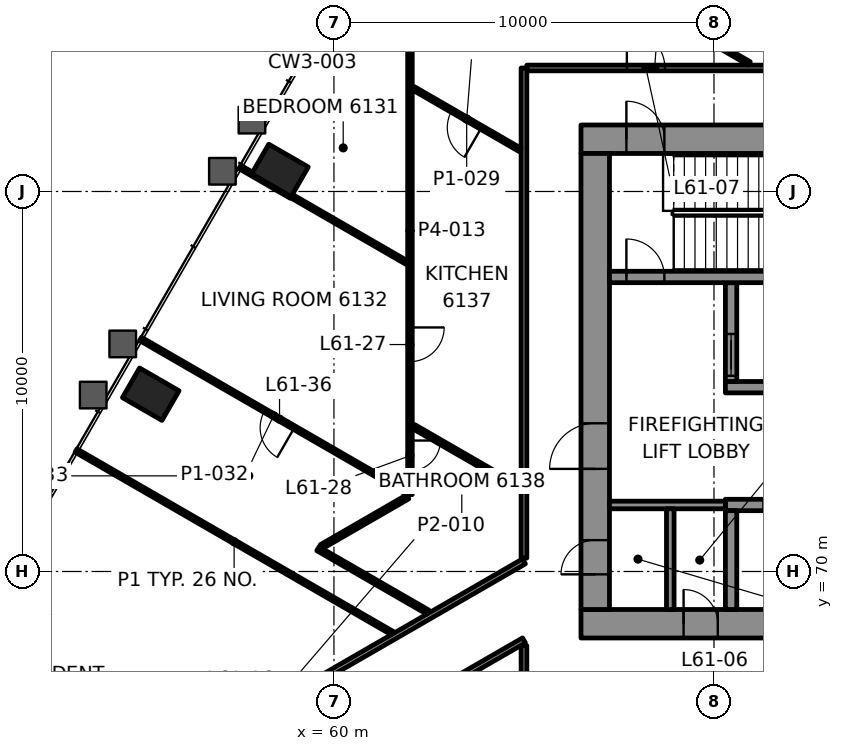
"""IFC4 building model, lengths in metres.
Left out: names, types, materials, properties, quantities, classifications, styles, units other than length and angle.
Written with IfcOpenShell. Run it as: python <this file> out.ifc"""

import sys

from ifc_helpers import new_model, si_unit, direction, frame, frame_2d, origin, origin_2d, place, context, subcontext, project, spatial, rectangle, hollow_rectangle, extrude, element, fill, save


model = new_model("IFC4")
c1 = context("Model", 3, precision=1e-05, world=origin(), true_north=direction((0.0, 1.0)))
c2 = subcontext(c1, "Body", "Model", "MODEL_VIEW")
j1 = project(units=[si_unit("LENGTHUNIT", "METRE"), si_unit("PLANEANGLEUNIT", "RADIAN")], contexts=[c1])
p1 = place(None, origin())
s1 = spatial("IfcSite", under=j1, at=p1, CompositionType="ELEMENT")
p2 = place(p1, origin())
s2 = spatial("IfcBuilding", under=s1, at=p2, CompositionType="ELEMENT")
p3 = place(p2, frame((0.0, 0.0, 260.1)))
s3 = spatial("IfcBuildingStorey", under=s2, at=p3, CompositionType="ELEMENT", Elevation=260.1)
for number, where, z_axis, x_axis in (
    (1, (58.579, 80.554, -0.0), (0.0, 0.0, 1.0), (-0.5, -0.866, 0.0)),
    (2, (55.179, 74.666, -0.0), (0.0, 0.0, 1.0), (-0.5, -0.866, 0.0)),
):
    element("IfcColumn", number, at=place(p3, frame(where, z_axis=z_axis, x_axis=x_axis)), inside=s3, PredefinedType="COLUMN", context=c2, shape_type="SweptSolid", body=[
        extrude(hollow_rectangle(XDim=0.9, YDim=1.2, WallThickness=0.06, at=origin_2d()), origin(), (0.0, 0.0, 1.0), 3.5),
    ])
p4 = place(p3, frame((66.5, 68.625, 0.0), z_axis=(0.0, 0.0, 1.0), x_axis=(1.0, 0.0, 0.0)))
e3 = element("IfcWall", 3, at=p4, inside=s3, PredefinedType="SHEAR", context=c2, shape_type="SweptSolid", body=[
    extrude(rectangle(XDim=17.0, YDim=0.75, at=frame_2d((8.5, 0.0))), origin(), (0.0, 0.0, 1.0), 3.3),
])
p5 = place(p4, frame((2.7, 0.0, 0.0)))
e4 = element("IfcOpeningElement", 4, at=p5, cuts=e3, PredefinedType="OPENING", context=c2, shape_type="SweptSolid", body=[
    extrude(rectangle(XDim=0.9, YDim=2.1, at=frame_2d((0.45, 1.05))), frame((0.0, 0.385, 0.0), z_axis=(0.0, -1.0, 0.0), x_axis=(1.0, 0.0, 0.0)), (0.0, 0.0, 1.0), 0.77),
])
p6 = place(p3, frame((66.5, 81.375, 0.0), z_axis=(0.0, 0.0, 1.0), x_axis=(1.0, 0.0, 0.0)))
e5 = element("IfcWall", 5, at=p6, inside=s3, PredefinedType="SHEAR", context=c2, shape_type="SweptSolid", body=[
    extrude(rectangle(XDim=17.0, YDim=0.75, at=frame_2d((8.5, 0.0))), origin(), (0.0, 0.0, 1.0), 3.3),
])
p7 = place(p6, frame((1.195, 0.0, 0.0)))
e6 = element("IfcOpeningElement", 6, at=p7, cuts=e5, PredefinedType="OPENING", context=c2, shape_type="SweptSolid", body=[
    extrude(rectangle(XDim=1.0, YDim=2.1, at=frame_2d((0.5, 1.05))), frame((0.0, 0.385, 0.0), z_axis=(0.0, -1.0, 0.0), x_axis=(1.0, 0.0, 0.0)), (0.0, 0.0, 1.0), 0.77),
])
p8 = place(p6, frame((15.005, 0.0, 0.0)))
e7 = element("IfcOpeningElement", 7, at=p8, cuts=e5, PredefinedType="OPENING", context=c2, shape_type="SweptSolid", body=[
    extrude(rectangle(XDim=1.0, YDim=2.1, at=frame_2d((0.5, 1.05))), frame((0.0, 0.385, 0.0), z_axis=(0.0, -1.0, 0.0), x_axis=(1.0, 0.0, 0.0)), (0.0, 0.0, 1.0), 0.77),
])
p9 = place(p6, frame((8.15, 0.0, 0.0)))
e8 = element("IfcOpeningElement", 8, at=p9, cuts=e5, PredefinedType="OPENING", context=c2, shape_type="SweptSolid", body=[
    extrude(rectangle(XDim=0.9, YDim=2.1, at=frame_2d((0.45, 1.05))), frame((0.0, 0.385, 0.0), z_axis=(0.0, -1.0, 0.0), x_axis=(1.0, 0.0, 0.0)), (0.0, 0.0, 1.0), 0.77),
])
p10 = place(p3, frame((66.875, 69.0, 0.0), z_axis=(0.0, 0.0, 1.0), x_axis=(0.0, 1.0, 0.0)))
e9 = element("IfcWall", 9, at=p10, inside=s3, PredefinedType="SHEAR", context=c2, shape_type="SweptSolid", body=[
    extrude(rectangle(XDim=12.0, YDim=0.75, at=frame_2d((6.0, 0.0))), origin(), (0.0, 0.0, 1.0), 3.3),
])
p11 = place(p10, frame((3.7, 0.0, 0.0)))
e10 = element("IfcOpeningElement", 10, at=p11, cuts=e9, PredefinedType="OPENING", context=c2, shape_type="SweptSolid", body=[
    extrude(rectangle(XDim=1.2, YDim=2.1, at=frame_2d((0.6, 1.05))), frame((0.0, 0.385, 0.0), z_axis=(0.0, -1.0, 0.0), x_axis=(1.0, 0.0, 0.0)), (0.0, 0.0, 1.0), 0.77),
])
p12 = place(p10, frame((0.925, 0.0, 0.0)))
e11 = element("IfcOpeningElement", 11, at=p12, cuts=e9, PredefinedType="OPENING", context=c2, shape_type="SweptSolid", body=[
    extrude(rectangle(XDim=0.9, YDim=2.1, at=frame_2d((0.45, 1.05))), frame((0.0, 0.385, 0.0), z_axis=(0.0, -1.0, 0.0), x_axis=(1.0, 0.0, 0.0)), (0.0, 0.0, 1.0), 0.77),
])
p13 = place(p3, frame((70.3, 71.75, 0.0), z_axis=(0.0, 0.0, 1.0), x_axis=(1.0, 0.0, 0.0)))
e12 = element("IfcWall", 12, at=p13, inside=s3, PredefinedType="SHEAR", context=c2, shape_type="SweptSolid", body=[
    extrude(rectangle(XDim=11.5, YDim=0.3, at=frame_2d((5.75, 0.0))), origin(), (0.0, 0.0, 1.0), 3.3),
])
p14 = place(p13, frame((1.0, 0.0, 0.0)))
e13 = element("IfcOpeningElement", 13, at=p14, cuts=e12, PredefinedType="OPENING", context=c2, shape_type="SweptSolid", body=[
    extrude(rectangle(XDim=1.1, YDim=2.1, at=frame_2d((0.55, 1.05))), frame((0.0, 0.16, 0.0), z_axis=(0.0, -1.0, 0.0), x_axis=(1.0, 0.0, 0.0)), (0.0, 0.0, 1.0), 0.32),
])
p15 = place(p13, frame((3.8, 0.0, 0.0)))
e14 = element("IfcOpeningElement", 14, at=p15, cuts=e12, PredefinedType="OPENING", context=c2, shape_type="SweptSolid", body=[
    extrude(rectangle(XDim=1.1, YDim=2.1, at=frame_2d((0.55, 1.05))), frame((0.0, 0.16, 0.0), z_axis=(0.0, -1.0, 0.0), x_axis=(1.0, 0.0, 0.0)), (0.0, 0.0, 1.0), 0.32),
])
p16 = place(p13, frame((6.6, 0.0, 0.0)))
e15 = element("IfcOpeningElement", 15, at=p16, cuts=e12, PredefinedType="OPENING", context=c2, shape_type="SweptSolid", body=[
    extrude(rectangle(XDim=1.1, YDim=2.1, at=frame_2d((0.55, 1.05))), frame((0.0, 0.16, 0.0), z_axis=(0.0, -1.0, 0.0), x_axis=(1.0, 0.0, 0.0)), (0.0, 0.0, 1.0), 0.32),
])
p17 = place(p13, frame((9.4, 0.0, 0.0)))
e16 = element("IfcOpeningElement", 16, at=p17, cuts=e12, PredefinedType="OPENING", context=c2, shape_type="SweptSolid", body=[
    extrude(rectangle(XDim=1.1, YDim=2.1, at=frame_2d((0.55, 1.05))), frame((0.0, 0.16, 0.0), z_axis=(0.0, -1.0, 0.0), x_axis=(1.0, 0.0, 0.0)), (0.0, 0.0, 1.0), 0.32),
])
p18 = place(p3, frame((70.3, 74.85, 0.0), z_axis=(0.0, 0.0, 1.0), x_axis=(1.0, 0.0, 0.0)))
e17 = element("IfcWall", 17, at=p18, inside=s3, PredefinedType="SHEAR", context=c2, shape_type="SweptSolid", body=[
    extrude(rectangle(XDim=5.9, YDim=0.3, at=frame_2d((2.95, 0.0))), origin(), (0.0, 0.0, 1.0), 3.3),
])
p19 = place(p18, frame((3.8, 0.0, 0.0)))
e18 = element("IfcOpeningElement", 18, at=p19, cuts=e17, PredefinedType="OPENING", context=c2, shape_type="SweptSolid", body=[
    extrude(rectangle(XDim=1.1, YDim=2.1, at=frame_2d((0.55, 1.05))), frame((0.0, 0.16, 0.0), z_axis=(0.0, -1.0, 0.0), x_axis=(1.0, 0.0, 0.0)), (0.0, 0.0, 1.0), 0.32),
])
p20 = place(p3, frame((70.45, 69.0, 0.0), z_axis=(0.0, 0.0, 1.0), x_axis=(0.0, 1.0, 0.0)))
e19 = element("IfcWall", 19, at=p20, inside=s3, PredefinedType="SHEAR", context=c2, shape_type="SweptSolid", body=[
    extrude(rectangle(XDim=2.6, YDim=0.3, at=frame_2d((1.3, 0.0))), origin(), (0.0, 0.0, 1.0), 3.3),
])
p21 = place(p3, frame((70.45, 75.0, 0.0), z_axis=(0.0, 0.0, 1.0), x_axis=(0.0, 1.0, 0.0)))
e20 = element("IfcWall", 20, at=p21, inside=s3, PredefinedType="SHEAR", context=c2, shape_type="SweptSolid", body=[
    extrude(rectangle(XDim=2.6, YDim=0.3, at=frame_2d((1.3, 0.0))), origin(), (0.0, 0.0, 1.0), 3.3),
])
p22 = place(p21, frame((0.15, 0.0, 0.0)))
e21 = element("IfcOpeningElement", 21, at=p22, cuts=e20, PredefinedType="OPENING", context=c2, shape_type="SweptSolid", body=[
    extrude(rectangle(XDim=1.1, YDim=2.1, at=frame_2d((0.55, 1.05))), frame((0.0, 0.16, 0.0), z_axis=(0.0, -1.0, 0.0), x_axis=(1.0, 0.0, 0.0)), (0.0, 0.0, 1.0), 0.32),
])
p23 = place(p3, frame((67.25, 77.75, 0.0), z_axis=(0.0, 0.0, 1.0), x_axis=(1.0, 0.0, 0.0)))
e22 = element("IfcWall", 22, at=p23, inside=s3, PredefinedType="SHEAR", context=c2, shape_type="SweptSolid", body=[
    extrude(rectangle(XDim=15.5, YDim=0.3, at=frame_2d((7.75, 0.0))), origin(), (0.0, 0.0, 1.0), 3.3),
])
p24 = place(p23, frame((0.445, 0.0, 0.0)))
e23 = element("IfcOpeningElement", 23, at=p24, cuts=e22, PredefinedType="OPENING", context=c2, shape_type="SweptSolid", body=[
    extrude(rectangle(XDim=1.0, YDim=2.1, at=frame_2d((0.5, 1.05))), frame((0.0, 0.16, 0.0), z_axis=(0.0, -1.0, 0.0), x_axis=(1.0, 0.0, 0.0)), (0.0, 0.0, 1.0), 0.32),
])
p25 = place(p3, frame((65.075, 83.25, 0.0), z_axis=(0.0, 0.0, 1.0), x_axis=(1.0, 0.0, 0.0)))
e24 = element("IfcWall", 24, at=p25, inside=s3, PredefinedType="PARTITIONING", context=c2, shape_type="SweptSolid", body=[
    extrude(rectangle(XDim=6.725, YDim=0.15, at=frame_2d((3.362, 0.0))), origin(), (0.0, 0.0, 1.0), 2.7),
])
p26 = place(p25, frame((2.632, 0.0, 0.0)))
e25 = element("IfcOpeningElement", 25, at=p26, cuts=e24, PredefinedType="OPENING", context=c2, shape_type="SweptSolid", body=[
    extrude(rectangle(XDim=1.0, YDim=2.1, at=frame_2d((0.5, 1.05))), frame((0.0, 0.085, 0.0), z_axis=(0.0, -1.0, 0.0), x_axis=(1.0, 0.0, 0.0)), (0.0, 0.0, 1.0), 0.17),
])
p27 = place(p3, frame((65.0, 68.187, 0.0), z_axis=(0.0, 0.0, 1.0), x_axis=(-0.866027660432, -0.499996091351, 0.0)))
e26 = element("IfcWall", 26, at=p27, inside=s3, PredefinedType="PARTITIONING", context=c2, shape_type="SweptSolid", body=[
    extrude(rectangle(XDim=14.494, YDim=0.15, at=frame_2d((7.247, 0.0))), origin(), (0.0, 0.0, 1.0), 2.547),
])
p28 = place(p27, frame((6.324, 0.0, 0.0)))
e27 = element("IfcOpeningElement", 27, at=p28, cuts=e26, PredefinedType="OPENING", context=c2, shape_type="SweptSolid", body=[
    extrude(rectangle(XDim=0.9, YDim=2.1, at=frame_2d((0.45, 1.05))), frame((0.0, 0.085, 0.0), z_axis=(0.0, -1.0, 0.0), x_axis=(1.0, 0.0, 0.0)), (0.0, 0.0, 1.0), 0.17),
])
p29 = place(p27, frame((12.004, 0.0, 0.0)))
e28 = element("IfcOpeningElement", 28, at=p29, cuts=e26, PredefinedType="OPENING", context=c2, shape_type="SweptSolid", body=[
    extrude(rectangle(XDim=0.9, YDim=2.1, at=frame_2d((0.45, 1.05))), frame((0.0, 0.085, 0.0), z_axis=(0.0, -1.0, 0.0), x_axis=(1.0, 0.0, 0.0)), (0.0, 0.0, 1.0), 0.17),
])
p30 = place(p3, frame((51.549, 62.5, 0.0), z_axis=(0.0, 0.0, 1.0), x_axis=(0.866020420161, 0.50000863179, 0.0)))
e29 = element("IfcWall", 29, at=p30, inside=s3, PredefinedType="PARTITIONING", context=c2, shape_type="SweptSolid", body=[
    extrude(rectangle(XDim=15.532, YDim=0.15, at=frame_2d((7.766, 0.0))), origin(), (0.0, 0.0, 1.0), 2.7),
])
p31 = place(p30, frame((5.474, 0.0, 0.0)))
e30 = element("IfcOpeningElement", 30, at=p31, cuts=e29, PredefinedType="OPENING", context=c2, shape_type="SweptSolid", body=[
    extrude(rectangle(XDim=0.9, YDim=2.1, at=frame_2d((0.45, 1.05))), frame((0.0, 0.085, 0.0), z_axis=(0.0, -1.0, 0.0), x_axis=(1.0, 0.0, 0.0)), (0.0, 0.0, 1.0), 0.17),
])
p32 = place(p3, frame((59.673, 70.655, 0.0), z_axis=(0.0, 0.0, 1.0), x_axis=(0.866053563643, 0.499951222523, 0.0)))
e31 = element("IfcWall", 31, at=p32, inside=s3, PredefinedType="PARTITIONING", context=c2, shape_type="SweptSolid", body=[
    extrude(rectangle(XDim=2.617, YDim=0.12, at=frame_2d((1.309, 0.0))), origin(), (0.0, 0.0, 1.0), 2.7),
])
p33 = place(p3, frame((65.0, 66.825, 0.0), z_axis=(0.0, 0.0, 1.0), x_axis=(0.0, 1.0, 0.0)))
e32 = element("IfcWall", 32, at=p33, inside=s3, PredefinedType="PARTITIONING", context=c2, shape_type="SweptSolid", body=[
    extrude(rectangle(XDim=1.226, YDim=0.15, at=frame_2d((0.613, 0.0))), origin(), (0.0, 0.0, 1.0), 2.547),
])
p34 = place(p3, frame((65.0, 70.352, 0.0), z_axis=(0.0, 0.0, 1.0), x_axis=(0.0, 1.0, 0.0)))
e33 = element("IfcWall", 33, at=p34, inside=s3, PredefinedType="PARTITIONING", context=c2, shape_type="SweptSolid", body=[
    extrude(rectangle(XDim=12.897, YDim=0.15, at=frame_2d((6.449, 0.0))), origin(), (0.0, 0.0, 1.0), 2.7),
])
p35 = place(p3, frame((62.0, 85.912, 0.0), z_axis=(0.0, 0.0, 1.0), x_axis=(0.0, -1.0, 0.0)))
e34 = element("IfcWall", 34, at=p35, inside=s3, PredefinedType="PARTITIONING", context=c2, shape_type="SweptSolid", body=[
    extrude(rectangle(XDim=13.888, YDim=0.12, at=frame_2d((6.944, 0.0))), origin(), (0.0, 0.0, 1.0), 2.7),
])
p36 = place(p35, frame((1.224, 0.0, 0.0)))
e35 = element("IfcOpeningElement", 35, at=p36, cuts=e34, PredefinedType="OPENING", context=c2, shape_type="SweptSolid", body=[
    extrude(rectangle(XDim=0.9, YDim=2.1, at=frame_2d((0.45, 1.05))), frame((0.0, 0.07, 0.0), z_axis=(0.0, -1.0, 0.0), x_axis=(1.0, 0.0, 0.0)), (0.0, 0.0, 1.0), 0.14),
])
p37 = place(p35, frame((9.49, 0.0, 0.0)))
e36 = element("IfcOpeningElement", 36, at=p37, cuts=e34, PredefinedType="OPENING", context=c2, shape_type="SweptSolid", body=[
    extrude(rectangle(XDim=0.9, YDim=2.1, at=frame_2d((0.45, 1.05))), frame((0.0, 0.07, 0.0), z_axis=(0.0, -1.0, 0.0), x_axis=(1.0, 0.0, 0.0)), (0.0, 0.0, 1.0), 0.14),
])
p38 = place(p35, frame((12.466, 0.0, 0.0)))
e37 = element("IfcOpeningElement", 37, at=p38, cuts=e34, PredefinedType="OPENING", context=c2, shape_type="SweptSolid", body=[
    extrude(rectangle(XDim=0.8, YDim=2.1, at=frame_2d((0.4, 1.05))), frame((0.0, 0.07, 0.0), z_axis=(0.0, -1.0, 0.0), x_axis=(1.0, 0.0, 0.0)), (0.0, 0.0, 1.0), 0.14),
])
p39 = place(p3, frame((70.929, 83.37, 0.0), z_axis=(0.0, 0.0, 1.0), x_axis=(-0.866032366698, 0.499987939687, 0.0)))
e38 = element("IfcWall", 38, at=p39, inside=s3, PredefinedType="PARTITIONING", context=c2, shape_type="SweptSolid", body=[
    extrude(rectangle(XDim=5.758, YDim=0.1, at=frame_2d((2.879, 0.0))), origin(), (0.0, 0.0, 1.0), 2.7),
])
p40 = place(p3, frame((64.899, 81.094, 0.0), z_axis=(0.0, 0.0, 1.0), x_axis=(-0.866032882975, 0.499987045439, 0.0)))
e39 = element("IfcWall", 39, at=p40, inside=s3, PredefinedType="PARTITIONING", context=c2, shape_type="SweptSolid", body=[
    extrude(rectangle(XDim=3.248, YDim=0.1, at=frame_2d((1.624, 0.0))), origin(), (0.0, 0.0, 1.0), 2.7),
])
p41 = place(p40, frame((1.174, 0.0, 0.0)))
e40 = element("IfcOpeningElement", 40, at=p41, cuts=e39, PredefinedType="OPENING", context=c2, shape_type="SweptSolid", body=[
    extrude(rectangle(XDim=0.9, YDim=2.1, at=frame_2d((0.45, 1.05))), frame((0.0, 0.06, 0.0), z_axis=(0.0, -1.0, 0.0), x_axis=(1.0, 0.0, 0.0)), (0.0, 0.0, 1.0), 0.12),
])
p42 = place(p3, frame((61.914, 78.129, 0.0), z_axis=(0.0, 0.0, 1.0), x_axis=(-0.866011380966, 0.500024287448, 0.0)))
e41 = element("IfcWall", 41, at=p42, inside=s3, PredefinedType="PARTITIONING", context=c2, shape_type="SweptSolid", body=[
    extrude(rectangle(XDim=3.501, YDim=0.1, at=frame_2d((1.75, 0.0))), origin(), (0.0, 0.0, 1.0), 2.7),
])
p43 = place(p3, frame((58.874, 79.865, 0.0), z_axis=(0.0, 0.0, 1.0), x_axis=(-0.865990094875, 0.500061151839, 0.0)))
e42 = element("IfcWall", 42, at=p43, inside=s3, PredefinedType="PARTITIONING", context=c2, shape_type="SweptSolid", body=[
    extrude(rectangle(XDim=1.56, YDim=0.1, at=frame_2d((0.78, 0.0))), origin(), (0.0, 0.0, 1.0), 2.688),
])
p44 = place(p3, frame((64.89, 72.2, 0.0), z_axis=(0.0, 0.0, 1.0), x_axis=(-0.866033195618, 0.499986503906, 0.0)))
e43 = element("IfcWall", 43, at=p44, inside=s3, PredefinedType="PARTITIONING", context=c2, shape_type="SweptSolid", body=[
    extrude(rectangle(XDim=3.228, YDim=0.12, at=frame_2d((1.614, 0.0))), origin(), (0.0, 0.0, 1.0), 2.7),
])
p45 = place(p3, frame((61.914, 72.076, 0.0), z_axis=(0.0, 0.0, 1.0), x_axis=(-0.86602370202, 0.50000294753, 0.0)))
e44 = element("IfcWall", 44, at=p45, inside=s3, PredefinedType="PARTITIONING", context=c2, shape_type="SweptSolid", body=[
    extrude(rectangle(XDim=8.087, YDim=0.1, at=frame_2d((4.043, 0.0))), origin(), (0.0, 0.0, 1.0), 2.688),
])
p46 = place(p45, frame((3.413, 0.0, 0.0)))
e45 = element("IfcOpeningElement", 45, at=p46, cuts=e44, PredefinedType="OPENING", context=c2, shape_type="SweptSolid", body=[
    extrude(rectangle(XDim=0.9, YDim=2.1, at=frame_2d((0.45, 1.05))), frame((0.0, 0.06, 0.0), z_axis=(0.0, -1.0, 0.0), x_axis=(1.0, 0.0, 0.0)), (0.0, 0.0, 1.0), 0.12),
])
p47 = place(p3, frame((62.469, 68.931, 0.0), z_axis=(0.0, 0.0, 1.0), x_axis=(-0.866033317326, 0.499986293093, 0.0)))
e46 = element("IfcWall", 46, at=p47, inside=s3, PredefinedType="PARTITIONING", context=c2, shape_type="SweptSolid", body=[
    extrude(rectangle(XDim=3.337, YDim=0.12, at=frame_2d((1.669, 0.0))), origin(), (0.0, 0.0, 1.0), 2.7),
])
p48 = place(p3, frame((61.532, 68.38, 0.0), z_axis=(0.0, 0.0, 1.0), x_axis=(-0.866022611517, 0.500004836318, 0.0)))
e47 = element("IfcWall", 47, at=p48, inside=s3, PredefinedType="PARTITIONING", context=c2, shape_type="SweptSolid", body=[
    extrude(rectangle(XDim=9.604, YDim=0.1, at=frame_2d((4.802, 0.0))), origin(), (0.0, 0.0, 1.0), 2.7),
])
p49 = place(p3, frame((67.25, 71.75, 0.0), z_axis=(0.0, 0.0, 1.0), x_axis=(1.0, 0.0, 0.0)))
e48 = element("IfcWall", 48, at=p49, inside=s3, PredefinedType="PARTITIONING", context=c2, shape_type="SweptSolid", body=[
    extrude(rectangle(XDim=3.05, YDim=0.2, at=frame_2d((1.525, 0.0))), origin(), (0.0, 0.0, 1.0), 3.3),
])
p50 = place(p3, frame((68.85, 69.0, 0.0), z_axis=(0.0, 0.0, 1.0), x_axis=(0.0, 1.0, 0.0)))
e49 = element("IfcWall", 49, at=p50, inside=s3, PredefinedType="PARTITIONING", context=c2, shape_type="SweptSolid", body=[
    extrude(rectangle(XDim=2.65, YDim=0.2, at=frame_2d((1.325, 0.0))), origin(), (0.0, 0.0, 1.0), 3.3),
])
p51 = place(p26, origin())
e50 = element("IfcDoor", 50, at=p51, inside=s3, OperationType="SINGLE_SWING_LEFT", PredefinedType="DOOR", context=c2, shape_type="SweptSolid", body=[
    extrude(rectangle(XDim=1.0, YDim=2.1, at=frame_2d((0.5, 1.05))), frame((0.0, 0.025, 0.0), z_axis=(0.0, -1.0, 0.0), x_axis=(1.0, 0.0, 0.0)), (0.0, 0.0, 1.0), 0.05),
])
fill(e25, e50)
p52 = place(p37, origin())
e51 = element("IfcDoor", 51, at=p52, inside=s3, OperationType="SINGLE_SWING_RIGHT", PredefinedType="DOOR", context=c2, shape_type="SweptSolid", body=[
    extrude(rectangle(XDim=0.9, YDim=2.1, at=frame_2d((0.45, 1.05))), frame((0.0, 0.025, 0.0), z_axis=(0.0, -1.0, 0.0), x_axis=(1.0, 0.0, 0.0)), (0.0, 0.0, 1.0), 0.05),
])
fill(e36, e51)
p53 = place(p38, origin())
e52 = element("IfcDoor", 52, at=p53, inside=s3, OperationType="SINGLE_SWING_RIGHT", PredefinedType="DOOR", context=c2, shape_type="SweptSolid", body=[
    extrude(rectangle(XDim=0.8, YDim=2.1, at=frame_2d((0.4, 1.05))), frame((0.0, 0.025, 0.0), z_axis=(0.0, -1.0, 0.0), x_axis=(1.0, 0.0, 0.0)), (0.0, 0.0, 1.0), 0.05),
])
fill(e37, e52)
p54 = place(p41, origin())
e53 = element("IfcDoor", 53, at=p54, inside=s3, OperationType="SINGLE_SWING_RIGHT", PredefinedType="DOOR", context=c2, shape_type="SweptSolid", body=[
    extrude(rectangle(XDim=0.9, YDim=2.1, at=frame_2d((0.45, 1.05))), frame((0.0, 0.025, 0.0), z_axis=(0.0, -1.0, 0.0), x_axis=(1.0, 0.0, 0.0)), (0.0, 0.0, 1.0), 0.05),
])
fill(e40, e53)
p55 = place(p46, origin())
e54 = element("IfcDoor", 54, at=p55, inside=s3, OperationType="SINGLE_SWING_RIGHT", PredefinedType="DOOR", context=c2, shape_type="SweptSolid", body=[
    extrude(rectangle(XDim=0.9, YDim=2.1, at=frame_2d((0.45, 1.05))), frame((0.0, 0.025, 0.0), z_axis=(0.0, -1.0, 0.0), x_axis=(1.0, 0.0, 0.0)), (0.0, 0.0, 1.0), 0.05),
])
fill(e45, e54)
p56 = place(p22, origin())
e55 = element("IfcDoor", 55, at=p56, inside=s3, OperationType="DOUBLE_DOOR_SLIDING", PredefinedType="DOOR", context=c2, shape_type="SweptSolid", body=[
    extrude(rectangle(XDim=1.1, YDim=2.1, at=frame_2d((0.55, 1.05))), frame((0.0, 0.025, 0.0), z_axis=(0.0, -1.0, 0.0), x_axis=(1.0, 0.0, 0.0)), (0.0, 0.0, 1.0), 0.05),
])
fill(e21, e55)
p57 = place(p24, origin())
e56 = element("IfcDoor", 56, at=p57, inside=s3, OperationType="SINGLE_SWING_LEFT", PredefinedType="DOOR", context=c2, shape_type="SweptSolid", body=[
    extrude(rectangle(XDim=1.0, YDim=2.1, at=frame_2d((0.5, 1.05))), frame((0.0, 0.025, 0.0), z_axis=(0.0, -1.0, 0.0), x_axis=(1.0, 0.0, 0.0)), (0.0, 0.0, 1.0), 0.05),
])
fill(e23, e56)
p58 = place(p7, origin())
e57 = element("IfcDoor", 57, at=p58, inside=s3, OperationType="SINGLE_SWING_RIGHT", PredefinedType="DOOR", context=c2, shape_type="SweptSolid", body=[
    extrude(rectangle(XDim=1.0, YDim=2.1, at=frame_2d((0.5, 1.05))), frame((0.0, 0.095, 0.0), z_axis=(0.0, -1.0, 0.0), x_axis=(1.0, 0.0, 0.0)), (0.0, 0.0, 1.0), 0.19),
])
fill(e6, e57)
p59 = place(p11, origin())
e58 = element("IfcDoor", 58, at=p59, inside=s3, OperationType="SINGLE_SWING_RIGHT", PredefinedType="DOOR", context=c2, shape_type="SweptSolid", body=[
    extrude(rectangle(XDim=1.2, YDim=2.1, at=frame_2d((0.6, 1.05))), frame((0.0, 0.095, 0.0), z_axis=(0.0, -1.0, 0.0), x_axis=(1.0, 0.0, 0.0)), (0.0, 0.0, 1.0), 0.19),
])
fill(e10, e58)
p60 = place(p12, origin())
e59 = element("IfcDoor", 59, at=p60, inside=s3, OperationType="SINGLE_SWING_RIGHT", PredefinedType="DOOR", context=c2, shape_type="SweptSolid", body=[
    extrude(rectangle(XDim=0.9, YDim=2.1, at=frame_2d((0.45, 1.05))), frame((0.0, 0.095, 0.0), z_axis=(0.0, -1.0, 0.0), x_axis=(1.0, 0.0, 0.0)), (0.0, 0.0, 1.0), 0.19),
])
fill(e11, e59)
p61 = place(p5, origin())
e60 = element("IfcDoor", 60, at=p61, inside=s3, OperationType="SINGLE_SWING_LEFT", PredefinedType="DOOR", context=c2, shape_type="SweptSolid", body=[
    extrude(rectangle(XDim=0.9, YDim=2.1, at=frame_2d((0.45, 1.05))), frame((0.0, 0.095, 0.0), z_axis=(0.0, -1.0, 0.0), x_axis=(1.0, 0.0, 0.0)), (0.0, 0.0, 1.0), 0.19),
])
fill(e4, e60)
save(model, sys.argv[1])
